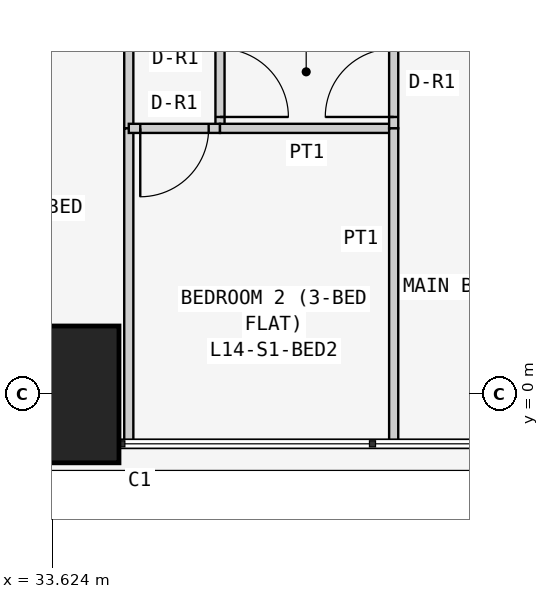
"""IFC4 building model, lengths in metres.
Left out: names, types, materials, properties, quantities, classifications, styles, units other than length and angle.
Written with IfcOpenShell. Run it as: python <this file> out.ifc"""

import sys

from ifc_helpers import new_model, si_unit, direction, frame, frame_2d, origin, origin_2d, place, context, subcontext, project, spatial, rectangle, extrude, element, fill, save


model = new_model("IFC4")
c1 = context("Model", 3, precision=1e-05, world=origin(), true_north=direction((0.0, 1.0)))
c2 = subcontext(c1, "Body", "Model", "MODEL_VIEW")
j1 = project(units=[si_unit("LENGTHUNIT", "METRE"), si_unit("PLANEANGLEUNIT", "RADIAN")], contexts=[c1])
p1 = place(None, origin())
s1 = spatial("IfcSite", under=j1, at=p1, CompositionType="ELEMENT")
p2 = place(p1, origin())
s2 = spatial("IfcBuilding", under=s1, at=p2, CompositionType="ELEMENT")
p3 = place(p2, frame((0.0, 0.0, 59.7)))
s3 = spatial("IfcBuildingStorey", under=s2, at=p3, CompositionType="ELEMENT", Elevation=59.7)
p4 = place(p3, frame((33.6, 0.0, 0.0), z_axis=(0.0, 0.0, 1.0), x_axis=(1.0, 0.0, 0.0)))
e1 = element("IfcColumn", 1, at=p4, inside=s3, PredefinedType="COLUMN", context=c2, shape_type="SweptSolid", body=[
    extrude(rectangle(XDim=1.8, YDim=1.8, at=origin_2d()), origin(), (0.0, 0.0, 1.0), 3.6),
])
p5 = place(p3, frame((34.629, 3.5, 0.0), z_axis=(0.0, 0.0, 1.0), x_axis=(0.0, 1.0, 0.0)))
e2 = element("IfcWall", 2, at=p5, inside=s3, PredefinedType="PARTITIONING", context=c2, shape_type="SweptSolid", body=[
    extrude(rectangle(XDim=4.9, YDim=0.12, at=frame_2d((2.45, 0.0))), origin(), (0.0, 0.0, 1.0), 3.45),
])
p6 = place(p5, frame((1.25, 0.0, 0.0)))
e3 = element("IfcOpeningElement", 3, at=p6, cuts=e2, PredefinedType="OPENING", context=c2, shape_type="SweptSolid", body=[
    extrude(rectangle(XDim=0.9, YDim=2.1, at=frame_2d((0.45, 1.05))), frame((0.0, 0.07, 0.0), z_axis=(0.0, -1.0, 0.0), x_axis=(1.0, 0.0, 0.0)), (0.0, 0.0, 1.0), 0.14),
])
p7 = place(p3, frame((34.629, -0.65, 0.0), z_axis=(0.0, 0.0, 1.0), x_axis=(0.0, 1.0, 0.0)))
e4 = element("IfcWall", 4, at=p7, inside=s3, PredefinedType="PARTITIONING", context=c2, shape_type="SweptSolid", body=[
    extrude(rectangle(XDim=4.15, YDim=0.12, at=frame_2d((2.075, 0.0))), origin(), (0.0, 0.0, 1.0), 3.45),
])
p8 = place(p3, frame((35.829, 3.5, 0.0), z_axis=(0.0, 0.0, 1.0), x_axis=(0.0, 1.0, 0.0)))
e5 = element("IfcWall", 5, at=p8, inside=s3, PredefinedType="PARTITIONING", context=c2, shape_type="SweptSolid", body=[
    extrude(rectangle(XDim=1.2, YDim=0.12, at=frame_2d((0.6, 0.0))), origin(), (0.0, 0.0, 1.0), 3.45),
])
p9 = place(p8, frame((0.15, 0.0, 0.0)))
e6 = element("IfcOpeningElement", 6, at=p9, cuts=e5, PredefinedType="OPENING", context=c2, shape_type="SweptSolid", body=[
    extrude(rectangle(XDim=0.9, YDim=2.1, at=frame_2d((0.45, 1.05))), frame((0.0, 0.07, 0.0), z_axis=(0.0, -1.0, 0.0), x_axis=(1.0, 0.0, 0.0)), (0.0, 0.0, 1.0), 0.14),
])
p10 = place(p3, frame((34.629, 3.5, 0.0), z_axis=(0.0, 0.0, 1.0), x_axis=(1.0, 0.0, 0.0)))
e7 = element("IfcWall", 7, at=p10, inside=s3, PredefinedType="PARTITIONING", context=c2, shape_type="SweptSolid", body=[
    extrude(rectangle(XDim=1.2, YDim=0.12, at=frame_2d((0.6, 0.0))), origin(), (0.0, 0.0, 1.0), 3.45),
])
p11 = place(p10, frame((0.151, 0.0, 0.0)))
e8 = element("IfcOpeningElement", 8, at=p11, cuts=e7, PredefinedType="OPENING", context=c2, shape_type="SweptSolid", body=[
    extrude(rectangle(XDim=0.9, YDim=2.1, at=frame_2d((0.45, 1.05))), frame((0.0, 0.07, 0.0), z_axis=(0.0, -1.0, 0.0), x_axis=(1.0, 0.0, 0.0)), (0.0, 0.0, 1.0), 0.14),
])
p12 = place(p3, frame((35.829, 3.5, 0.0), z_axis=(0.0, 0.0, 1.0), x_axis=(1.0, 0.0, 0.0)))
e9 = element("IfcWall", 9, at=p12, inside=s3, PredefinedType="PARTITIONING", context=c2, shape_type="SweptSolid", body=[
    extrude(rectangle(XDim=2.285, YDim=0.12, at=frame_2d((1.143, 0.0))), origin(), (0.0, 0.0, 1.0), 3.45),
])
p13 = place(p3, frame((38.114, 3.5, 0.0), z_axis=(0.0, 0.0, 1.0), x_axis=(0.0, 1.0, 0.0)))
e10 = element("IfcWall", 10, at=p13, inside=s3, PredefinedType="PARTITIONING", context=c2, shape_type="SweptSolid", body=[
    extrude(rectangle(XDim=1.2, YDim=0.12, at=frame_2d((0.6, 0.0))), origin(), (0.0, 0.0, 1.0), 3.45),
])
p14 = place(p13, frame((0.15, 0.0, 0.0)))
e11 = element("IfcOpeningElement", 11, at=p14, cuts=e10, PredefinedType="OPENING", context=c2, shape_type="SweptSolid", body=[
    extrude(rectangle(XDim=0.9, YDim=2.1, at=frame_2d((0.45, 1.05))), frame((0.0, 0.07, 0.0), z_axis=(0.0, -1.0, 0.0), x_axis=(1.0, 0.0, 0.0)), (0.0, 0.0, 1.0), 0.14),
])
p15 = place(p3, frame((38.114, -0.65, 0.0), z_axis=(0.0, 0.0, 1.0), x_axis=(0.0, 1.0, 0.0)))
e12 = element("IfcWall", 12, at=p15, inside=s3, PredefinedType="PARTITIONING", context=c2, shape_type="SweptSolid", body=[
    extrude(rectangle(XDim=4.15, YDim=0.12, at=frame_2d((2.075, 0.0))), origin(), (0.0, 0.0, 1.0), 3.45),
])
p16 = place(p9, frame((0.9, 0.0, 0.0), z_axis=(0.0, 0.0, 1.0), x_axis=(-1.0, 0.0, 0.0)))
e13 = element("IfcDoor", 13, at=p16, inside=s3, OperationType="SINGLE_SWING_RIGHT", PredefinedType="DOOR", context=c2, shape_type="SweptSolid", body=[
    extrude(rectangle(XDim=0.9, YDim=2.1, at=frame_2d((0.45, 1.05))), frame((0.0, 0.025, 0.0), z_axis=(0.0, -1.0, 0.0), x_axis=(1.0, 0.0, 0.0)), (0.0, 0.0, 1.0), 0.05),
])
fill(e6, e13)
p17 = place(p14, origin())
e14 = element("IfcDoor", 14, at=p17, inside=s3, OperationType="SINGLE_SWING_LEFT", PredefinedType="DOOR", context=c2, shape_type="SweptSolid", body=[
    extrude(rectangle(XDim=0.9, YDim=2.1, at=frame_2d((0.45, 1.05))), frame((0.0, 0.025, 0.0), z_axis=(0.0, -1.0, 0.0), x_axis=(1.0, 0.0, 0.0)), (0.0, 0.0, 1.0), 0.05),
])
fill(e11, e14)
p18 = place(p11, frame((0.9, 0.0, 0.0), z_axis=(0.0, 0.0, 1.0), x_axis=(-1.0, 0.0, 0.0)))
e15 = element("IfcDoor", 15, at=p18, inside=s3, OperationType="SINGLE_SWING_RIGHT", PredefinedType="DOOR", context=c2, shape_type="SweptSolid", body=[
    extrude(rectangle(XDim=0.9, YDim=2.1, at=frame_2d((0.45, 1.05))), frame((0.0, 0.025, 0.0), z_axis=(0.0, -1.0, 0.0), x_axis=(1.0, 0.0, 0.0)), (0.0, 0.0, 1.0), 0.05),
])
fill(e8, e15)
save(model, sys.argv[1])
